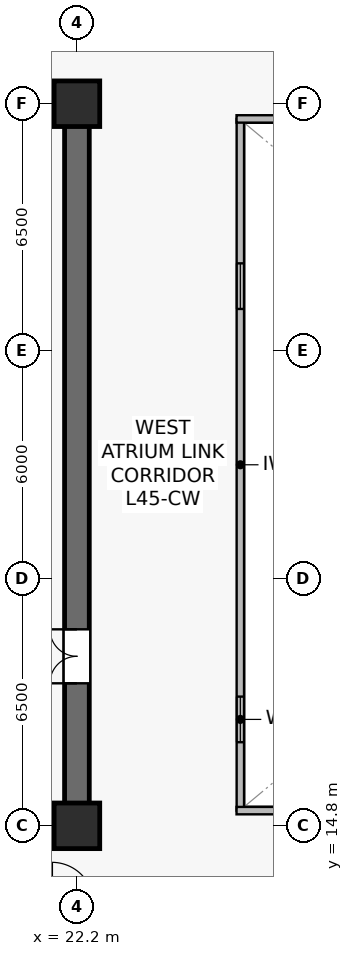
"""IFC4 building model, lengths in metres.
Left out: names, types, materials, properties, quantities, classifications, styles, units other than length and angle.
Written with IfcOpenShell. Run it as: python <this file> out.ifc"""

import sys

from ifc_helpers import new_model, si_unit, direction, frame, frame_2d, origin, origin_2d, place, context, subcontext, project, spatial, rectangle, extrude, source, transform, mapped, element, fill, save


model = new_model("IFC4")
c1 = context("Model", 3, precision=1e-05, world=origin(), true_north=direction((0.0, 1.0)))
c2 = subcontext(c1, "Body", "Model", "MODEL_VIEW")
j1 = project(units=[si_unit("LENGTHUNIT", "METRE"), si_unit("PLANEANGLEUNIT", "RADIAN")], contexts=[c1])
p1 = place(None, origin())
s1 = spatial("IfcSite", under=j1, at=p1, CompositionType="ELEMENT")
p2 = place(p1, origin())
s2 = spatial("IfcBuilding", under=s1, at=p2, CompositionType="ELEMENT")
p3 = place(p2, frame((0.0, 0.0, 187.1)))
s3 = spatial("IfcBuildingStorey", under=s2, at=p3, CompositionType="ELEMENT", Elevation=187.1)
p4 = place(p3, frame((7.075, 14.8, 0.0), z_axis=(0.0, 0.0, 1.0), x_axis=(1.0, 0.0, 0.0)))
e1 = element("IfcWall", 1, at=p4, inside=s3, PredefinedType="SHEAR", context=c2, shape_type="SweptSolid", body=[
    extrude(rectangle(XDim=15.45, YDim=0.65, at=frame_2d((7.725, 0.0))), origin(), (0.0, 0.0, 1.0), 3.79),
])
p5 = place(p3, frame((7.075, 33.8, 0.0), z_axis=(0.0, 0.0, 1.0), x_axis=(1.0, 0.0, 0.0)))
e2 = element("IfcWall", 2, at=p5, inside=s3, PredefinedType="SHEAR", context=c2, shape_type="SweptSolid", body=[
    extrude(rectangle(XDim=15.45, YDim=0.65, at=frame_2d((7.725, 0.0))), origin(), (0.0, 0.0, 1.0), 3.79),
])
p6 = place(p5, frame((5.25, 0.0, 0.0)))
e3 = element("IfcOpeningElement", 3, at=p6, cuts=e2, PredefinedType="OPENING", context=c2, shape_type="SweptSolid", body=[
    extrude(rectangle(XDim=0.95, YDim=2.15, at=frame_2d((0.475, 1.075))), frame((0.0, 0.335, 0.0), z_axis=(0.0, -1.0, 0.0), x_axis=(1.0, 0.0, 0.0)), (0.0, 0.0, 1.0), 0.67),
])
p7 = place(p5, frame((7.765, 0.0, 0.0)))
e4 = element("IfcOpeningElement", 4, at=p7, cuts=e2, PredefinedType="OPENING", context=c2, shape_type="SweptSolid", body=[
    extrude(rectangle(XDim=0.95, YDim=2.15, at=frame_2d((0.475, 1.075))), frame((0.0, 0.335, 0.0), z_axis=(0.0, -1.0, 0.0), x_axis=(1.0, 0.0, 0.0)), (0.0, 0.0, 1.0), 0.67),
])
p8 = place(p5, frame((10.315, 0.0, 0.0)))
e5 = element("IfcOpeningElement", 5, at=p8, cuts=e2, PredefinedType="OPENING", context=c2, shape_type="SweptSolid", body=[
    extrude(rectangle(XDim=0.95, YDim=2.15, at=frame_2d((0.475, 1.075))), frame((0.0, 0.335, 0.0), z_axis=(0.0, -1.0, 0.0), x_axis=(1.0, 0.0, 0.0)), (0.0, 0.0, 1.0), 0.67),
])
p9 = place(p5, frame((12.865, 0.0, 0.0)))
e6 = element("IfcOpeningElement", 6, at=p9, cuts=e2, PredefinedType="OPENING", context=c2, shape_type="SweptSolid", body=[
    extrude(rectangle(XDim=0.95, YDim=2.15, at=frame_2d((0.475, 1.075))), frame((0.0, 0.335, 0.0), z_axis=(0.0, -1.0, 0.0), x_axis=(1.0, 0.0, 0.0)), (0.0, 0.0, 1.0), 0.67),
])
p10 = place(p3, frame((22.2, 15.125, 0.0), z_axis=(0.0, 0.0, 1.0), x_axis=(0.0, 1.0, 0.0)))
e7 = element("IfcWall", 7, at=p10, inside=s3, PredefinedType="SHEAR", context=c2, shape_type="SweptSolid", body=[
    extrude(rectangle(XDim=18.35, YDim=0.65, at=frame_2d((9.175, 0.0))), origin(), (0.0, 0.0, 1.0), 3.79),
])
p11 = place(p10, frame((3.425, 0.0, 0.0)))
e8 = element("IfcOpeningElement", 8, at=p11, cuts=e7, PredefinedType="OPENING", context=c2, shape_type="SweptSolid", body=[
    extrude(rectangle(XDim=1.42, YDim=2.2, at=frame_2d((0.71, 1.1))), frame((0.0, 0.335, 0.0), z_axis=(0.0, -1.0, 0.0), x_axis=(1.0, 0.0, 0.0)), (0.0, 0.0, 1.0), 0.67),
])
m1 = source(origin(), c2, "Body", "SweptSolid", [
    extrude(rectangle(XDim=1.2, YDim=1.2, at=origin_2d()), origin(), (0.0, 0.0, 1.0), 4.1),
])
for number, where, z_axis, x_axis in (
    (9, (22.2, 14.8, 0.0), (0.0, 0.0, 1.0), (1.0, 0.0, 0.0)),
    (10, (22.2, 33.8, 0.0), (0.0, 0.0, 1.0), (1.0, 0.0, 0.0)),
):
    element("IfcColumn", number, at=place(p3, frame(where, z_axis=z_axis, x_axis=x_axis)), inside=s3, PredefinedType="COLUMN", context=c2, shape_type="MappedRepresentation", body=[
        mapped(m1, transform((0.0, 0.0, 0.0), scale=1.0)),
    ])
p12 = place(p3, frame((26.5, 15.2, 0.0), z_axis=(0.0, 0.0, 1.0), x_axis=(0.0, 1.0, 0.0)))
e11 = element("IfcWall", 11, at=p12, inside=s3, PredefinedType="SOLIDWALL", context=c2, shape_type="SweptSolid", body=[
    extrude(rectangle(XDim=18.2, YDim=0.195, at=frame_2d((9.1, 0.0))), origin(), (0.0, 0.0, 1.0), 3.79),
])
p13 = place(p12, frame((1.8, 0.0, 0.9)))
e12 = element("IfcOpeningElement", 12, at=p13, cuts=e11, PredefinedType="OPENING", context=c2, shape_type="SweptSolid", body=[
    extrude(rectangle(XDim=1.2, YDim=1.35, at=frame_2d((0.6, 0.675))), frame((0.0, 0.107, 0.0), z_axis=(0.0, -1.0, 0.0), x_axis=(1.0, 0.0, 0.0)), (0.0, 0.0, 1.0), 0.215),
])
p14 = place(p12, frame((13.2, 0.0, 0.9)))
e13 = element("IfcOpeningElement", 13, at=p14, cuts=e11, PredefinedType="OPENING", context=c2, shape_type="SweptSolid", body=[
    extrude(rectangle(XDim=1.2, YDim=1.35, at=frame_2d((0.6, 0.675))), frame((0.0, 0.107, 0.0), z_axis=(0.0, -1.0, 0.0), x_axis=(1.0, 0.0, 0.0)), (0.0, 0.0, 1.0), 0.215),
])
for number, where, z_axis, x_axis in (
    (14, (26.4, 15.2, 0.0), (0.0, 0.0, 1.0), (1.0, 0.0, 0.0)),
    (15, (26.4, 33.4, 0.0), (0.0, 0.0, 1.0), (1.0, 0.0, 0.0)),
):
    element("IfcWall", number, at=place(p3, frame(where, z_axis=z_axis, x_axis=x_axis)), inside=s3, PredefinedType="SOLIDWALL", context=c2, shape_type="SweptSolid", body=[
        extrude(rectangle(XDim=22.0, YDim=0.195, at=frame_2d((11.0, 0.0))), origin(), (0.0, 0.0, 1.0), 3.79),
    ])
m2 = source(origin(), c2, "Body", "SweptSolid", [
    extrude(rectangle(XDim=1.2, YDim=1.35, at=frame_2d((0.6, 0.675))), frame((0.0, 0.03, 0.0), z_axis=(0.0, -1.0, 0.0), x_axis=(1.0, 0.0, 0.0)), (0.0, 0.0, 1.0), 0.06),
])
p15 = place(p13, origin())
e16 = element("IfcWindow", 16, at=p15, inside=s3, PartitioningType="SINGLE_PANEL", PredefinedType="WINDOW", context=c2, shape_type="MappedRepresentation", body=[
    mapped(m2, transform((0.0, 0.0, 0.0), scale=1.0)),
])
fill(e12, e16)
p16 = place(p14, origin())
e17 = element("IfcWindow", 17, at=p16, inside=s3, PartitioningType="SINGLE_PANEL", PredefinedType="WINDOW", context=c2, shape_type="MappedRepresentation", body=[
    mapped(m2, transform((0.0, 0.0, 0.0), scale=1.0)),
])
fill(e13, e17)
m3 = source(origin(), c2, "Body", "SweptSolid", [
    extrude(rectangle(XDim=1.42, YDim=2.2, at=frame_2d((0.71, 1.1))), frame((0.0, 0.025, 0.0), z_axis=(0.0, -1.0, 0.0), x_axis=(1.0, 0.0, 0.0)), (0.0, 0.0, 1.0), 0.05),
])
p17 = place(p11, origin())
e18 = element("IfcDoor", 18, at=p17, inside=s3, OperationType="DOUBLE_DOOR_SINGLE_SWING", PredefinedType="DOOR", context=c2, shape_type="MappedRepresentation", body=[
    mapped(m3, transform((0.0, 0.0, 0.0), scale=1.0)),
])
fill(e8, e18)
save(model, sys.argv[1])
